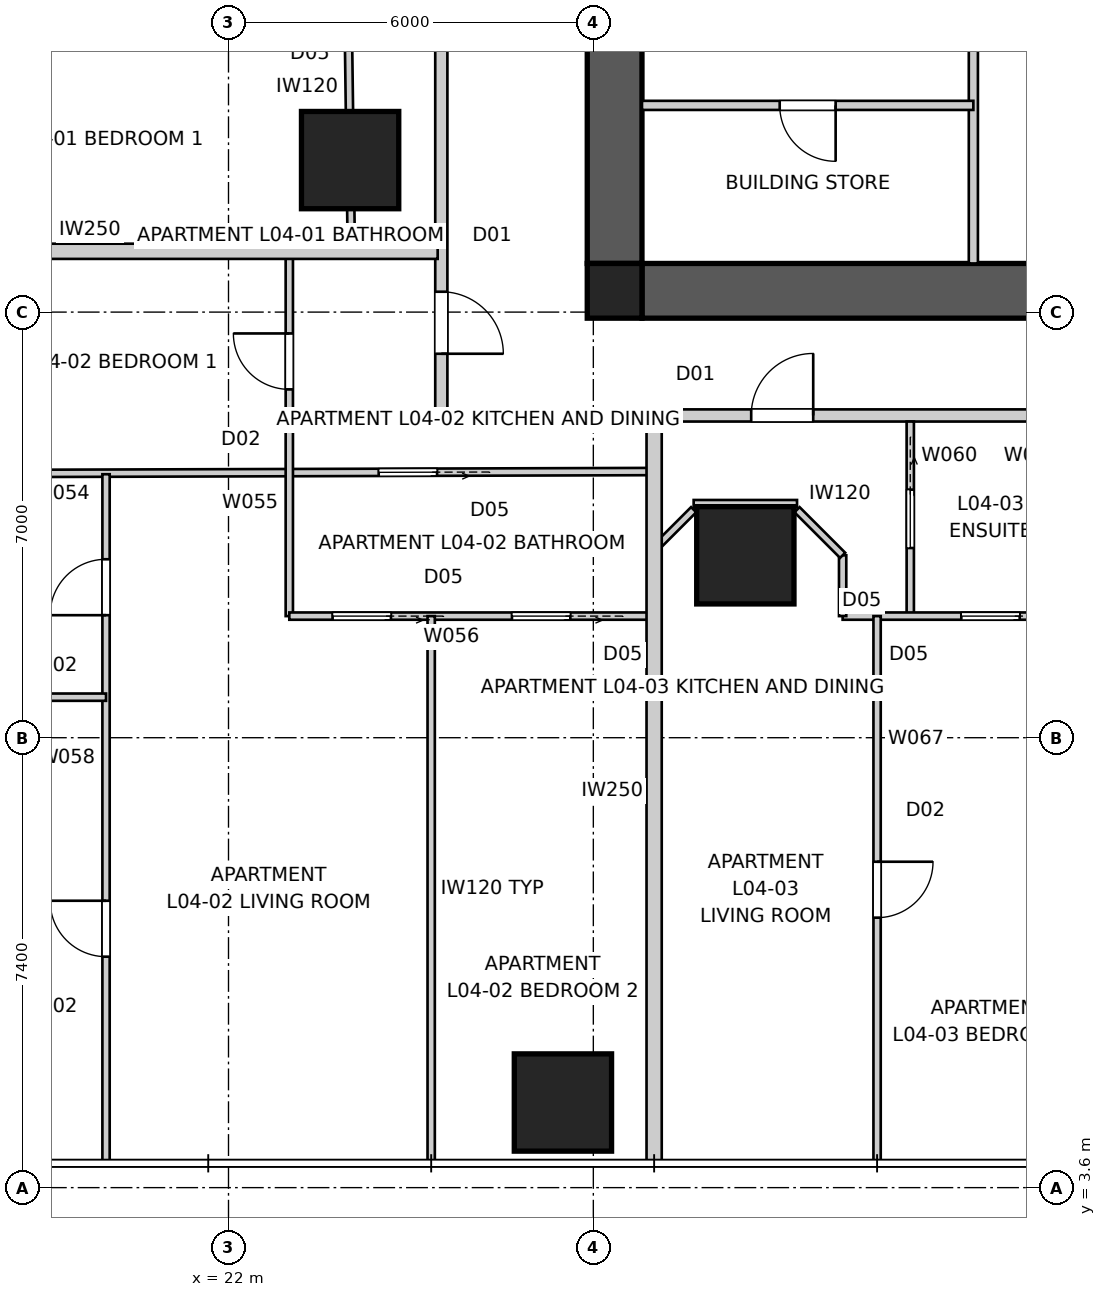
"""IFC4 building model, lengths in metres.
Left out: names, types, materials, properties, quantities, classifications, styles, units other than length and angle.
Written with IfcOpenShell. Run it as: python <this file> out.ifc"""

import sys

from ifc_helpers import new_model, si_unit, direction, frame, frame_2d, origin, origin_2d, place, context, subcontext, project, spatial, polyline, rectangle, outline, extrude, element, fill, save


model = new_model("IFC4")
c1 = context("Model", 3, precision=1e-05, world=origin(), true_north=direction((0.0, 1.0)))
c2 = subcontext(c1, "Body", "Model", "MODEL_VIEW")
j1 = project(units=[si_unit("LENGTHUNIT", "METRE"), si_unit("PLANEANGLEUNIT", "RADIAN")], contexts=[c1])
p1 = place(None, origin())
s1 = spatial("IfcSite", under=j1, at=p1, CompositionType="ELEMENT")
p2 = place(p1, origin())
s2 = spatial("IfcBuilding", under=s1, at=p2, CompositionType="ELEMENT")
p3 = place(p2, frame((0.0, 0.0, 18.4)))
s3 = spatial("IfcBuildingStorey", under=s2, at=p3, CompositionType="ELEMENT", Elevation=18.4)
p4 = place(p3, frame((51.2, 18.35, 0.0), z_axis=(0.0, 0.0, 1.0), x_axis=(-1.0, 0.0, 0.0)))
e1 = element("IfcWall", 1, at=p4, inside=s3, PredefinedType="SHEAR", context=c2, shape_type="SweptSolid", body=[
    extrude(outline(polyline([(0.0, -0.45), (22.4, -0.45), (22.4, -0.025), (22.85, -0.025), (22.85, 0.025), (22.4, 0.025), (22.4, 0.45), (0.0, 0.45), (0.0, 0.025), (-0.45, 0.025), (-0.45, -0.025), (0.0, -0.025), (0.0, -0.45)])), origin(), (0.0, 0.0, 1.0), 3.4),
])
p5 = place(p3, frame((28.35, 41.2, 0.0), z_axis=(0.0, 0.0, 1.0), x_axis=(0.0, -1.0, 0.0)))
e2 = element("IfcWall", 2, at=p5, inside=s3, PredefinedType="SHEAR", context=c2, shape_type="SweptSolid", body=[
    extrude(outline(polyline([(0.0, -0.45), (22.4, -0.45), (22.4, -0.025), (22.85, -0.025), (22.85, 0.025), (22.4, 0.025), (22.4, 0.45), (0.0, 0.45), (0.0, 0.025), (-0.45, 0.025), (-0.45, -0.025), (0.0, -0.025), (0.0, -0.45)])), origin(), (0.0, 0.0, 1.0), 3.4),
])
p6 = place(p5, frame((11.14, 0.0, 0.0)))
e3 = element("IfcOpeningElement", 3, at=p6, cuts=e2, PredefinedType="OPENING", context=c2, shape_type="SweptSolid", body=[
    extrude(rectangle(XDim=1.02, YDim=2.4, at=frame_2d((0.51, 1.2))), frame((0.0, 0.46, 0.0), z_axis=(0.0, -1.0, 0.0), x_axis=(1.0, 0.0, 0.0)), (0.0, 0.0, 1.0), 0.92),
])
p7 = place(p3, frame((28.35, 18.35, 0.0), z_axis=(0.0, 0.0, 1.0), x_axis=(1.0, 0.0, 0.0)))
e4 = element("IfcColumn", 4, at=p7, inside=s3, PredefinedType="COLUMN", context=c2, shape_type="SweptSolid", body=[
    extrude(rectangle(XDim=0.9, YDim=0.9, at=origin_2d()), origin(), (0.0, 0.0, 1.0), 3.4),
])
for number, where, z_axis, x_axis in (
    (5, (27.5, 5.0, 0.0), (0.0, 0.0, 1.0), (1.0, 0.0, 0.0)),
    (6, (24.0, 20.5, 0.0), (0.0, 0.0, 1.0), (1.0, 0.0, 0.0)),
    (7, (30.5, 14.0, 0.0), (0.0, 0.0, 1.0), (1.0, 0.0, 0.0)),
):
    element("IfcColumn", number, at=place(p3, frame(where, z_axis=z_axis, x_axis=x_axis)), inside=s3, PredefinedType="COLUMN", context=c2, shape_type="SweptSolid", body=[
        extrude(rectangle(XDim=1.6, YDim=1.6, at=origin_2d()), origin(), (0.0, 0.0, 1.0), 3.4),
    ])
p8 = place(p3, frame((25.5, 16.3, 0.0), z_axis=(0.0, 0.0, 1.0), x_axis=(1.0, 0.0, 0.0)))
e8 = element("IfcWall", 8, at=p8, inside=s3, PredefinedType="PARTITIONING", context=c2, shape_type="SweptSolid", body=[
    extrude(rectangle(XDim=29.0, YDim=0.2, at=frame_2d((14.5, 0.0))), origin(), (0.0, 0.0, 1.0), 3.25),
])
p9 = place(p8, frame((18.734, 0.0, 0.0)))
e9 = element("IfcOpeningElement", 9, at=p9, cuts=e8, PredefinedType="OPENING", context=c2, shape_type="SweptSolid", body=[
    extrude(rectangle(XDim=1.02, YDim=2.34, at=frame_2d((0.51, 1.17))), frame((0.0, 0.11, 0.0), z_axis=(0.0, -1.0, 0.0), x_axis=(1.0, 0.0, 0.0)), (0.0, 0.0, 1.0), 0.22),
])
p10 = place(p8, frame((5.096, 0.0, 0.0)))
e10 = element("IfcOpeningElement", 10, at=p10, cuts=e8, PredefinedType="OPENING", context=c2, shape_type="SweptSolid", body=[
    extrude(rectangle(XDim=1.02, YDim=2.34, at=frame_2d((0.51, 1.17))), frame((0.0, 0.11, 0.0), z_axis=(0.0, -1.0, 0.0), x_axis=(1.0, 0.0, 0.0)), (0.0, 0.0, 1.0), 0.22),
])
p11 = place(p3, frame((25.5, 43.7, 0.0), z_axis=(0.0, 0.0, 1.0), x_axis=(0.0, -1.0, 0.0)))
e11 = element("IfcWall", 11, at=p11, inside=s3, PredefinedType="PARTITIONING", context=c2, shape_type="SweptSolid", body=[
    extrude(rectangle(XDim=27.4, YDim=0.2, at=frame_2d((13.7, 0.0))), origin(), (0.0, 0.0, 1.0), 3.25),
])
p12 = place(p11, frame((5.493, 0.0, 0.0)))
e12 = element("IfcOpeningElement", 12, at=p12, cuts=e11, PredefinedType="OPENING", context=c2, shape_type="SweptSolid", body=[
    extrude(rectangle(XDim=1.02, YDim=2.34, at=frame_2d((0.51, 1.17))), frame((0.0, 0.11, 0.0), z_axis=(0.0, -1.0, 0.0), x_axis=(1.0, 0.0, 0.0)), (0.0, 0.0, 1.0), 0.22),
])
p13 = place(p11, frame((15.16, 0.0, 0.0)))
e13 = element("IfcOpeningElement", 13, at=p13, cuts=e11, PredefinedType="OPENING", context=c2, shape_type="SweptSolid", body=[
    extrude(rectangle(XDim=1.02, YDim=2.34, at=frame_2d((0.51, 1.17))), frame((0.0, 0.11, 0.0), z_axis=(0.0, -1.0, 0.0), x_axis=(1.0, 0.0, 0.0)), (0.0, 0.0, 1.0), 0.22),
])
p14 = place(p11, frame((25.365, 0.0, 0.0)))
e14 = element("IfcOpeningElement", 14, at=p14, cuts=e11, PredefinedType="OPENING", context=c2, shape_type="SweptSolid", body=[
    extrude(rectangle(XDim=1.02, YDim=2.34, at=frame_2d((0.51, 1.17))), frame((0.0, 0.11, 0.0), z_axis=(0.0, -1.0, 0.0), x_axis=(1.0, 0.0, 0.0)), (0.0, 0.0, 1.0), 0.22),
])
p15 = place(p11, frame((1.015, 0.0, 0.0)))
e15 = element("IfcOpeningElement", 15, at=p15, cuts=e11, PredefinedType="OPENING", context=c2, shape_type="SweptSolid", body=[
    extrude(rectangle(XDim=1.02, YDim=2.34, at=frame_2d((0.51, 1.17))), frame((0.0, 0.11, 0.0), z_axis=(0.0, -1.0, 0.0), x_axis=(1.0, 0.0, 0.0)), (0.0, 0.0, 1.0), 0.22),
])
p16 = place(p3, frame((29.0, 4.0, 0.0), z_axis=(0.0, 0.0, 1.0), x_axis=(0.0, 1.0, 0.0)))
e16 = element("IfcWall", 16, at=p16, inside=s3, PredefinedType="PARTITIONING", context=c2, shape_type="SweptSolid", body=[
    extrude(rectangle(XDim=12.24, YDim=0.25, at=frame_2d((6.12, 0.0))), origin(), (0.0, 0.0, 1.0), 3.25),
])
p17 = place(p3, frame((14.0, 19.0, 0.0), z_axis=(0.0, 0.0, 1.0), x_axis=(1.0, 0.0, 0.0)))
e17 = element("IfcWall", 17, at=p17, inside=s3, PredefinedType="PARTITIONING", context=c2, shape_type="SweptSolid", body=[
    extrude(rectangle(XDim=11.44, YDim=0.25, at=frame_2d((5.72, 0.0))), origin(), (0.0, 0.0, 1.0), 3.25),
])
p18 = place(p3, frame((34.25, 18.8, 0.0), z_axis=(0.0, 0.0, 1.0), x_axis=(0.0, 1.0, 0.0)))
e18 = element("IfcWall", 18, at=p18, inside=s3, PredefinedType="SOLIDWALL", context=c2, shape_type="SweptSolid", body=[
    extrude(rectangle(XDim=5.9, YDim=0.15, at=frame_2d((2.95, 0.0))), origin(), (0.0, 0.0, 1.0), 3.25),
])
p19 = place(p3, frame((34.25, 21.4, 0.0), z_axis=(0.0, 0.0, 1.0), x_axis=(-1.0, 0.0, 0.0)))
e19 = element("IfcWall", 19, at=p19, inside=s3, PredefinedType="SOLIDWALL", context=c2, shape_type="SweptSolid", body=[
    extrude(rectangle(XDim=5.45, YDim=0.15, at=frame_2d((2.725, 0.0))), origin(), (0.0, 0.0, 1.0), 3.25),
])
p20 = place(p19, frame((2.265, 0.0, 0.0)))
e20 = element("IfcOpeningElement", 20, at=p20, cuts=e19, PredefinedType="OPENING", context=c2, shape_type="SweptSolid", body=[
    extrude(rectangle(XDim=0.92, YDim=2.1, at=frame_2d((0.46, 1.05))), frame((0.0, 0.085, 0.0), z_axis=(0.0, -1.0, 0.0), x_axis=(1.0, 0.0, 0.0)), (0.0, 0.0, 1.0), 0.17),
])
p21 = place(p3, frame((24.02, 19.0, 0.0), z_axis=(0.0, 0.0, 1.0), x_axis=(-0.013494388256, 0.999908946597, 0.0)))
e21 = element("IfcWall", 21, at=p21, inside=s3, PredefinedType="PARTITIONING", context=c2, shape_type="SweptSolid", body=[
    extrude(rectangle(XDim=3.872, YDim=0.12, at=frame_2d((1.936, 0.0))), origin(), (0.0, 0.0, 1.0), 2.55),
])
p22 = place(p3, frame((29.0, 15.378, 0.0), z_axis=(0.0, 0.0, 1.0), x_axis=(-0.999995589081, -0.002970154664, 0.0)))
e22 = element("IfcWall", 22, at=p22, inside=s3, PredefinedType="PARTITIONING", context=c2, shape_type="SweptSolid", body=[
    extrude(rectangle(XDim=14.96, YDim=0.12, at=frame_2d((7.48, 0.0))), origin(), (0.0, 0.0, 1.0), 2.638),
])
p23 = place(p22, frame((3.57, 0.0, 0.0)))
e23 = element("IfcOpeningElement", 23, at=p23, cuts=e22, PredefinedType="OPENING", context=c2, shape_type="SweptSolid", body=[
    extrude(rectangle(XDim=0.96, YDim=2.1, at=frame_2d((0.48, 1.05))), frame((0.0, 0.07, 0.0), z_axis=(0.0, -1.0, 0.0), x_axis=(1.0, 0.0, 0.0)), (0.0, 0.0, 1.0), 0.14),
])
p24 = place(p3, frame((23.0, 13.0, 0.0), z_axis=(0.0, 0.0, 1.0), x_axis=(0.0, 1.0, 0.0)))
e24 = element("IfcWall", 24, at=p24, inside=s3, PredefinedType="PARTITIONING", context=c2, shape_type="SweptSolid", body=[
    extrude(rectangle(XDim=6.0, YDim=0.12, at=frame_2d((3.0, 0.0))), origin(), (0.0, 0.0, 1.0), 3.25),
])
p25 = place(p24, frame((3.729, 0.0, 0.0)))
e25 = element("IfcOpeningElement", 25, at=p25, cuts=e24, PredefinedType="OPENING", context=c2, shape_type="SweptSolid", body=[
    extrude(rectangle(XDim=0.92, YDim=2.34, at=frame_2d((0.46, 1.17))), frame((0.0, 0.07, 0.0), z_axis=(0.0, -1.0, 0.0), x_axis=(1.0, 0.0, 0.0)), (0.0, 0.0, 1.0), 0.14),
])
p26 = place(p3, frame((29.0, 13.0, 0.0), z_axis=(0.0, 0.0, 1.0), x_axis=(-1.0, 0.0, 0.0)))
e26 = element("IfcWall", 26, at=p26, inside=s3, PredefinedType="PARTITIONING", context=c2, shape_type="SweptSolid", body=[
    extrude(rectangle(XDim=6.0, YDim=0.12, at=frame_2d((3.0, 0.0))), origin(), (0.0, 0.0, 1.0), 3.25),
])
p27 = place(p26, frame((1.378, 0.0, 0.0)))
e27 = element("IfcOpeningElement", 27, at=p27, cuts=e26, PredefinedType="OPENING", context=c2, shape_type="SweptSolid", body=[
    extrude(rectangle(XDim=0.96, YDim=2.1, at=frame_2d((0.48, 1.05))), frame((0.0, 0.07, 0.0), z_axis=(0.0, -1.0, 0.0), x_axis=(1.0, 0.0, 0.0)), (0.0, 0.0, 1.0), 0.14),
])
p28 = place(p26, frame((4.328, 0.0, 0.0)))
e28 = element("IfcOpeningElement", 28, at=p28, cuts=e26, PredefinedType="OPENING", context=c2, shape_type="SweptSolid", body=[
    extrude(rectangle(XDim=0.96, YDim=2.1, at=frame_2d((0.48, 1.05))), frame((0.0, 0.07, 0.0), z_axis=(0.0, -1.0, 0.0), x_axis=(1.0, 0.0, 0.0)), (0.0, 0.0, 1.0), 0.14),
])
p29 = place(p3, frame((25.333, 13.0, 0.0), z_axis=(0.0, 0.0, 1.0), x_axis=(0.0, -1.0, 0.0)))
e29 = element("IfcWall", 29, at=p29, inside=s3, PredefinedType="PARTITIONING", context=c2, shape_type="SweptSolid", body=[
    extrude(rectangle(XDim=8.96, YDim=0.12, at=frame_2d((4.48, 0.0))), origin(), (0.0, 0.0, 1.0), 2.638),
])
p30 = place(p3, frame((19.986, 4.04, 0.0), z_axis=(0.0, 0.0, 1.0), x_axis=(0.0, 1.0, 0.0)))
e30 = element("IfcWall", 30, at=p30, inside=s3, PredefinedType="PARTITIONING", context=c2, shape_type="SweptSolid", body=[
    extrude(rectangle(XDim=11.293, YDim=0.12, at=frame_2d((5.646, 0.0))), origin(), (0.0, 0.0, 1.0), 3.25),
])
p31 = place(p30, frame((3.358, 0.0, 0.0)))
e31 = element("IfcOpeningElement", 31, at=p31, cuts=e30, PredefinedType="OPENING", context=c2, shape_type="SweptSolid", body=[
    extrude(rectangle(XDim=0.92, YDim=2.34, at=frame_2d((0.46, 1.17))), frame((0.0, 0.07, 0.0), z_axis=(0.0, -1.0, 0.0), x_axis=(1.0, 0.0, 0.0)), (0.0, 0.0, 1.0), 0.14),
])
p32 = place(p30, frame((8.975, 0.0, 0.0)))
e32 = element("IfcOpeningElement", 32, at=p32, cuts=e30, PredefinedType="OPENING", context=c2, shape_type="SweptSolid", body=[
    extrude(rectangle(XDim=0.92, YDim=2.34, at=frame_2d((0.46, 1.17))), frame((0.0, 0.07, 0.0), z_axis=(0.0, -1.0, 0.0), x_axis=(1.0, 0.0, 0.0)), (0.0, 0.0, 1.0), 0.14),
])
p33 = place(p3, frame((14.04, 11.667, 0.0), z_axis=(0.0, 0.0, 1.0), x_axis=(1.0, 0.0, 0.0)))
e33 = element("IfcWall", 33, at=p33, inside=s3, PredefinedType="PARTITIONING", context=c2, shape_type="SweptSolid", body=[
    extrude(rectangle(XDim=5.946, YDim=0.12, at=frame_2d((2.973, 0.0))), origin(), (0.0, 0.0, 1.0), 3.25),
])
p34 = place(p3, frame((33.212, 16.2, 0.0), z_axis=(0.0, 0.0, 1.0), x_axis=(0.0, -1.0, 0.0)))
e34 = element("IfcWall", 34, at=p34, inside=s3, PredefinedType="PARTITIONING", context=c2, shape_type="SweptSolid", body=[
    extrude(rectangle(XDim=3.2, YDim=0.12, at=frame_2d((1.6, 0.0))), origin(), (0.0, 0.0, 1.0), 3.25),
])
p35 = place(p34, frame((1.12, 0.0, 0.0)))
e35 = element("IfcOpeningElement", 35, at=p35, cuts=e34, PredefinedType="OPENING", context=c2, shape_type="SweptSolid", body=[
    extrude(rectangle(XDim=0.96, YDim=2.1, at=frame_2d((0.48, 1.05))), frame((0.0, 0.07, 0.0), z_axis=(0.0, -1.0, 0.0), x_axis=(1.0, 0.0, 0.0)), (0.0, 0.0, 1.0), 0.14),
])
p36 = place(p3, frame((47.9, 13.0, 0.0), z_axis=(0.0, 0.0, 1.0), x_axis=(-1.0, 0.0, 0.0)))
e36 = element("IfcWall", 36, at=p36, inside=s3, PredefinedType="PARTITIONING", context=c2, shape_type="SweptSolid", body=[
    extrude(rectangle(XDim=15.8, YDim=0.12, at=frame_2d((7.9, 0.0))), origin(), (0.0, 0.0, 1.0), 2.55),
])
p37 = place(p36, frame((2.083, 0.0, 0.0)))
e37 = element("IfcOpeningElement", 37, at=p37, cuts=e36, PredefinedType="OPENING", context=c2, shape_type="SweptSolid", body=[
    extrude(rectangle(XDim=0.92, YDim=2.34, at=frame_2d((0.46, 1.17))), frame((0.0, 0.07, 0.0), z_axis=(0.0, -1.0, 0.0), x_axis=(1.0, 0.0, 0.0)), (0.0, 0.0, 1.0), 0.14),
])
p38 = place(p36, frame((6.225, 0.0, 0.0)))
e38 = element("IfcOpeningElement", 38, at=p38, cuts=e36, PredefinedType="OPENING", context=c2, shape_type="SweptSolid", body=[
    extrude(rectangle(XDim=0.96, YDim=2.1, at=frame_2d((0.48, 1.05))), frame((0.0, 0.07, 0.0), z_axis=(0.0, -1.0, 0.0), x_axis=(1.0, 0.0, 0.0)), (0.0, 0.0, 1.0), 0.14),
])
p39 = place(p36, frame((12.888, 0.0, 0.0)))
e39 = element("IfcOpeningElement", 39, at=p39, cuts=e36, PredefinedType="OPENING", context=c2, shape_type="SweptSolid", body=[
    extrude(rectangle(XDim=0.96, YDim=2.1, at=frame_2d((0.48, 1.05))), frame((0.0, 0.07, 0.0), z_axis=(0.0, -1.0, 0.0), x_axis=(1.0, 0.0, 0.0)), (0.0, 0.0, 1.0), 0.14),
])
p40 = place(p36, frame((9.278, 0.0, 0.0)))
e40 = element("IfcOpeningElement", 40, at=p40, cuts=e36, PredefinedType="OPENING", context=c2, shape_type="SweptSolid", body=[
    extrude(rectangle(XDim=0.96, YDim=2.1, at=frame_2d((0.48, 1.05))), frame((0.0, 0.07, 0.0), z_axis=(0.0, -1.0, 0.0), x_axis=(1.0, 0.0, 0.0)), (0.0, 0.0, 1.0), 0.14),
])
p41 = place(p3, frame((32.1, 13.0, 0.0), z_axis=(0.0, 0.0, 1.0), x_axis=(0.0, 1.0, 0.0)))
e41 = element("IfcWall", 41, at=p41, inside=s3, PredefinedType="PARTITIONING", context=c2, shape_type="SweptSolid", body=[
    extrude(rectangle(XDim=1.0, YDim=0.12, at=frame_2d((0.5, 0.0))), origin(), (0.0, 0.0, 1.0), 3.25),
])
p42 = place(p3, frame((32.1, 14.0, 0.0), z_axis=(0.0, 0.0, 1.0), x_axis=(-0.707106781187, 0.707106781187, 0.0)))
e42 = element("IfcWall", 42, at=p42, inside=s3, PredefinedType="PARTITIONING", context=c2, shape_type="SweptSolid", body=[
    extrude(rectangle(XDim=1.061, YDim=0.12, at=frame_2d((0.53, 0.0))), origin(), (0.0, 0.0, 1.0), 3.25),
])
p43 = place(p3, frame((31.35, 14.85, 0.0), z_axis=(0.0, 0.0, 1.0), x_axis=(-1.0, 0.0, 0.0)))
e43 = element("IfcWall", 43, at=p43, inside=s3, PredefinedType="PARTITIONING", context=c2, shape_type="SweptSolid", body=[
    extrude(rectangle(XDim=1.7, YDim=0.12, at=frame_2d((0.85, 0.0))), origin(), (0.0, 0.0, 1.0), 3.25),
])
p44 = place(p3, frame((29.65, 14.75, 0.0), z_axis=(0.0, 0.0, 1.0), x_axis=(-0.707106781187, -0.707106781187, 0.0)))
e44 = element("IfcWall", 44, at=p44, inside=s3, PredefinedType="PARTITIONING", context=c2, shape_type="SweptSolid", body=[
    extrude(rectangle(XDim=0.919, YDim=0.12, at=frame_2d((0.459, 0.0))), origin(), (0.0, 0.0, 1.0), 3.25),
])
p45 = place(p3, frame((32.667, 13.0, 0.0), z_axis=(0.0, 0.0, 1.0), x_axis=(0.0, -1.0, 0.0)))
e45 = element("IfcWall", 45, at=p45, inside=s3, PredefinedType="PARTITIONING", context=c2, shape_type="SweptSolid", body=[
    extrude(rectangle(XDim=8.96, YDim=0.12, at=frame_2d((4.48, 0.0))), origin(), (0.0, 0.0, 1.0), 3.25),
])
p46 = place(p45, frame((4.04, 0.0, 0.0)))
e46 = element("IfcOpeningElement", 46, at=p46, cuts=e45, PredefinedType="OPENING", context=c2, shape_type="SweptSolid", body=[
    extrude(rectangle(XDim=0.92, YDim=2.34, at=frame_2d((0.46, 1.17))), frame((0.0, 0.07, 0.0), z_axis=(0.0, -1.0, 0.0), x_axis=(1.0, 0.0, 0.0)), (0.0, 0.0, 1.0), 0.14),
])
p47 = place(p10, origin())
e47 = element("IfcDoor", 47, at=p47, inside=s3, OperationType="SINGLE_SWING_RIGHT", PredefinedType="DOOR", context=c2, shape_type="SweptSolid", body=[
    extrude(rectangle(XDim=1.02, YDim=2.34, at=frame_2d((0.51, 1.17))), frame((0.0, 0.025, 0.0), z_axis=(0.0, -1.0, 0.0), x_axis=(1.0, 0.0, 0.0)), (0.0, 0.0, 1.0), 0.05),
])
fill(e10, e47)
p48 = place(p14, origin())
e48 = element("IfcDoor", 48, at=p48, inside=s3, OperationType="SINGLE_SWING_RIGHT", PredefinedType="DOOR", context=c2, shape_type="SweptSolid", body=[
    extrude(rectangle(XDim=1.02, YDim=2.34, at=frame_2d((0.51, 1.17))), frame((0.0, 0.025, 0.0), z_axis=(0.0, -1.0, 0.0), x_axis=(1.0, 0.0, 0.0)), (0.0, 0.0, 1.0), 0.05),
])
fill(e14, e48)
p49 = place(p20, origin())
e49 = element("IfcDoor", 49, at=p49, inside=s3, OperationType="SINGLE_SWING_LEFT", PredefinedType="DOOR", context=c2, shape_type="SweptSolid", body=[
    extrude(rectangle(XDim=0.92, YDim=2.1, at=frame_2d((0.46, 1.05))), frame((0.0, 0.025, 0.0), z_axis=(0.0, -1.0, 0.0), x_axis=(1.0, 0.0, 0.0)), (0.0, 0.0, 1.0), 0.05),
])
fill(e20, e49)
p50 = place(p35, origin())
e50 = element("IfcDoor", 50, at=p50, inside=s3, OperationType="SLIDING_TO_LEFT", PredefinedType="DOOR", context=c2, shape_type="SweptSolid", body=[
    extrude(rectangle(XDim=0.96, YDim=2.1, at=frame_2d((0.48, 1.05))), frame((0.0, 0.025, 0.0), z_axis=(0.0, -1.0, 0.0), x_axis=(1.0, 0.0, 0.0)), (0.0, 0.0, 1.0), 0.05),
])
fill(e35, e50)
p51 = place(p23, origin())
e51 = element("IfcDoor", 51, at=p51, inside=s3, OperationType="SLIDING_TO_LEFT", PredefinedType="DOOR", context=c2, shape_type="SweptSolid", body=[
    extrude(rectangle(XDim=0.96, YDim=2.1, at=frame_2d((0.48, 1.05))), frame((0.0, 0.025, 0.0), z_axis=(0.0, -1.0, 0.0), x_axis=(1.0, 0.0, 0.0)), (0.0, 0.0, 1.0), 0.05),
])
fill(e23, e51)
p52 = place(p25, origin())
e52 = element("IfcDoor", 52, at=p52, inside=s3, OperationType="SINGLE_SWING_RIGHT", PredefinedType="DOOR", context=c2, shape_type="SweptSolid", body=[
    extrude(rectangle(XDim=0.92, YDim=2.34, at=frame_2d((0.46, 1.17))), frame((0.0, 0.025, 0.0), z_axis=(0.0, -1.0, 0.0), x_axis=(1.0, 0.0, 0.0)), (0.0, 0.0, 1.0), 0.05),
])
fill(e25, e52)
p53 = place(p39, origin())
e53 = element("IfcDoor", 53, at=p53, inside=s3, OperationType="SLIDING_TO_LEFT", PredefinedType="DOOR", context=c2, shape_type="SweptSolid", body=[
    extrude(rectangle(XDim=0.96, YDim=2.1, at=frame_2d((0.48, 1.05))), frame((0.0, 0.025, 0.0), z_axis=(0.0, -1.0, 0.0), x_axis=(1.0, 0.0, 0.0)), (0.0, 0.0, 1.0), 0.05),
])
fill(e39, e53)
p54 = place(p27, origin())
e54 = element("IfcDoor", 54, at=p54, inside=s3, OperationType="SLIDING_TO_LEFT", PredefinedType="DOOR", context=c2, shape_type="SweptSolid", body=[
    extrude(rectangle(XDim=0.96, YDim=2.1, at=frame_2d((0.48, 1.05))), frame((0.0, 0.025, 0.0), z_axis=(0.0, -1.0, 0.0), x_axis=(1.0, 0.0, 0.0)), (0.0, 0.0, 1.0), 0.05),
])
fill(e27, e54)
p55 = place(p28, origin())
e55 = element("IfcDoor", 55, at=p55, inside=s3, OperationType="SLIDING_TO_LEFT", PredefinedType="DOOR", context=c2, shape_type="SweptSolid", body=[
    extrude(rectangle(XDim=0.96, YDim=2.1, at=frame_2d((0.48, 1.05))), frame((0.0, 0.025, 0.0), z_axis=(0.0, -1.0, 0.0), x_axis=(1.0, 0.0, 0.0)), (0.0, 0.0, 1.0), 0.05),
])
fill(e28, e55)
p56 = place(p31, origin())
e56 = element("IfcDoor", 56, at=p56, inside=s3, OperationType="SINGLE_SWING_RIGHT", PredefinedType="DOOR", context=c2, shape_type="SweptSolid", body=[
    extrude(rectangle(XDim=0.92, YDim=2.34, at=frame_2d((0.46, 1.17))), frame((0.0, 0.025, 0.0), z_axis=(0.0, -1.0, 0.0), x_axis=(1.0, 0.0, 0.0)), (0.0, 0.0, 1.0), 0.05),
])
fill(e31, e56)
p57 = place(p32, origin())
e57 = element("IfcDoor", 57, at=p57, inside=s3, OperationType="SINGLE_SWING_LEFT", PredefinedType="DOOR", context=c2, shape_type="SweptSolid", body=[
    extrude(rectangle(XDim=0.92, YDim=2.34, at=frame_2d((0.46, 1.17))), frame((0.0, 0.025, 0.0), z_axis=(0.0, -1.0, 0.0), x_axis=(1.0, 0.0, 0.0)), (0.0, 0.0, 1.0), 0.05),
])
fill(e32, e57)
p58 = place(p46, origin())
e58 = element("IfcDoor", 58, at=p58, inside=s3, OperationType="SINGLE_SWING_LEFT", PredefinedType="DOOR", context=c2, shape_type="SweptSolid", body=[
    extrude(rectangle(XDim=0.92, YDim=2.34, at=frame_2d((0.46, 1.17))), frame((0.0, 0.025, 0.0), z_axis=(0.0, -1.0, 0.0), x_axis=(1.0, 0.0, 0.0)), (0.0, 0.0, 1.0), 0.05),
])
fill(e46, e58)
save(model, sys.argv[1])
